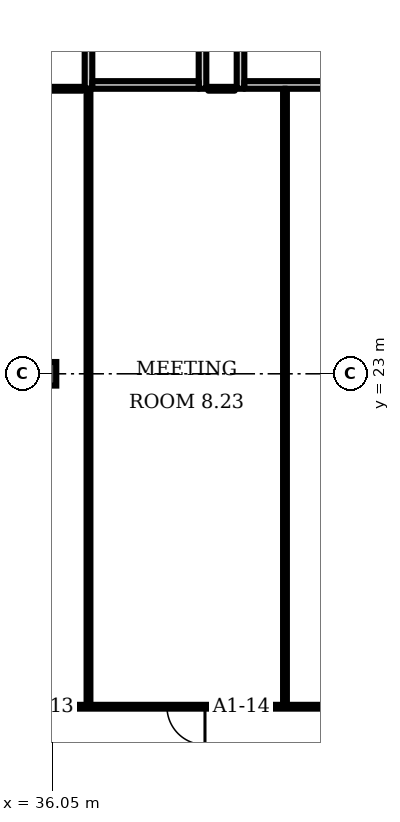
"""IFC4 building model, lengths in metres.
Left out: names, types, materials, properties, quantities, classifications, styles, units other than length and angle.
Written with IfcOpenShell. Run it as: python <this file> out.ifc"""

import sys

from ifc_helpers import new_model, si_unit, direction, frame, frame_2d, origin, origin_2d, place, context, subcontext, project, spatial, rectangle, i_section, extrude, element, fill, save


model = new_model("IFC4")
c1 = context("Model", 3, precision=1e-05, world=origin(), true_north=direction((0.0, 1.0)))
c2 = subcontext(c1, "Body", "Model", "MODEL_VIEW")
j1 = project(units=[si_unit("LENGTHUNIT", "METRE"), si_unit("PLANEANGLEUNIT", "RADIAN")], contexts=[c1])
p1 = place(None, origin())
s1 = spatial("IfcSite", under=j1, at=p1, CompositionType="ELEMENT")
p2 = place(p1, origin())
s2 = spatial("IfcBuilding", under=s1, at=p2, CompositionType="ELEMENT")
p3 = place(p2, frame((0.0, 0.0, 48.7)))
s3 = spatial("IfcBuildingStorey", under=s2, at=p3, CompositionType="ELEMENT", Elevation=48.7)
p4 = place(p3, frame((36.0, 23.0, 0.0), z_axis=(0.0, 0.0, 1.0), x_axis=(1.0, 0.0, 0.0)))
e1 = element("IfcColumn", 1, at=p4, inside=s3, PredefinedType="COLUMN", context=c2, shape_type="SweptSolid", body=[
    extrude(i_section(OverallWidth=0.305, OverallDepth=0.62, WebThickness=0.021, FlangeThickness=0.04, FilletRadius=0.027, at=origin_2d()), origin(), (0.0, 0.0, 1.0), 3.6),
])
p5 = place(p3, frame((37.0, 30.5, 0.0), z_axis=(0.0, 0.0, 1.0), x_axis=(0.0, 1.0, 0.0)))
e2 = element("IfcWall", 2, at=p5, inside=s3, PredefinedType="PARTITIONING", context=c2, shape_type="SweptSolid", body=[
    extrude(rectangle(XDim=3.5, YDim=0.2, at=frame_2d((1.75, 0.0))), origin(), (0.0, 0.0, 1.0), 3.2),
])
p6 = place(p5, frame((1.2, 0.0, 0.0)))
e3 = element("IfcOpeningElement", 3, at=p6, cuts=e2, PredefinedType="OPENING", context=c2, shape_type="SweptSolid", body=[
    extrude(rectangle(XDim=1.1, YDim=2.1, at=frame_2d((0.55, 1.05))), frame((0.0, 0.11, 0.0), z_axis=(0.0, -1.0, 0.0), x_axis=(1.0, 0.0, 0.0)), (0.0, 0.0, 1.0), 0.22),
])
p7 = place(p3, frame((40.0, 30.5, 0.0), z_axis=(0.0, 0.0, 1.0), x_axis=(0.0, 1.0, 0.0)))
e4 = element("IfcWall", 4, at=p7, inside=s3, PredefinedType="PARTITIONING", context=c2, shape_type="SweptSolid", body=[
    extrude(rectangle(XDim=3.5, YDim=0.2, at=frame_2d((1.75, 0.0))), origin(), (0.0, 0.0, 1.0), 3.2),
])
p8 = place(p3, frame((37.1, 30.6, 0.0), z_axis=(0.0, 0.0, 1.0), x_axis=(1.0, 0.0, 0.0)))
e5 = element("IfcWall", 5, at=p8, inside=s3, PredefinedType="PARTITIONING", context=c2, shape_type="SweptSolid", body=[
    extrude(rectangle(XDim=2.8, YDim=0.2, at=frame_2d((1.4, 0.0))), origin(), (0.0, 0.0, 1.0), 3.2),
])
p9 = place(p3, frame((41.0, 30.5, 0.0), z_axis=(0.0, 0.0, 1.0), x_axis=(0.0, 1.0, 0.0)))
e6 = element("IfcWall", 6, at=p9, inside=s3, PredefinedType="PARTITIONING", context=c2, shape_type="SweptSolid", body=[
    extrude(rectangle(XDim=3.5, YDim=0.2, at=frame_2d((1.75, 0.0))), origin(), (0.0, 0.0, 1.0), 3.2),
])
p10 = place(p3, frame((41.1, 30.6, 0.0), z_axis=(0.0, 0.0, 1.0), x_axis=(1.0, 0.0, 0.0)))
e7 = element("IfcWall", 7, at=p10, inside=s3, PredefinedType="PARTITIONING", context=c2, shape_type="SweptSolid", body=[
    extrude(rectangle(XDim=2.8, YDim=0.2, at=frame_2d((1.4, 0.0))), origin(), (0.0, 0.0, 1.0), 3.2),
])
p11 = place(p3, frame((10.8, 30.5, 0.0), z_axis=(0.0, 0.0, 1.0), x_axis=(1.0, 0.0, 0.0)))
e8 = element("IfcWall", 8, at=p11, inside=s3, PredefinedType="PARTITIONING", context=c2, shape_type="SweptSolid", body=[
    extrude(rectangle(XDim=26.05, YDim=0.1, at=frame_2d((13.025, 0.0))), origin(), (0.0, 0.0, 1.0), 3.2),
])
p12 = place(p11, frame((0.235, 0.0, 0.0)))
e9 = element("IfcOpeningElement", 9, at=p12, cuts=e8, PredefinedType="OPENING", context=c2, shape_type="SweptSolid", body=[
    extrude(rectangle(XDim=1.0, YDim=2.1, at=frame_2d((0.5, 1.05))), frame((0.0, 0.06, 0.0), z_axis=(0.0, -1.0, 0.0), x_axis=(1.0, 0.0, 0.0)), (0.0, 0.0, 1.0), 0.12),
])
p13 = place(p11, frame((10.955, 0.0, 0.0)))
e10 = element("IfcOpeningElement", 10, at=p13, cuts=e8, PredefinedType="OPENING", context=c2, shape_type="SweptSolid", body=[
    extrude(rectangle(XDim=1.0, YDim=2.1, at=frame_2d((0.5, 1.05))), frame((0.0, 0.06, 0.0), z_axis=(0.0, -1.0, 0.0), x_axis=(1.0, 0.0, 0.0)), (0.0, 0.0, 1.0), 0.12),
])
p14 = place(p3, frame((11.2, 14.24, 0.0), z_axis=(0.0, 0.0, 1.0), x_axis=(1.0, 0.0, 0.0)))
e11 = element("IfcWall", 11, at=p14, inside=s3, PredefinedType="PARTITIONING", context=c2, shape_type="SweptSolid", body=[
    extrude(rectangle(XDim=51.635, YDim=0.1, at=frame_2d((25.817, 0.0))), origin(), (0.0, 0.0, 1.0), 3.2),
])
p15 = place(p14, frame((0.115, 0.0, 0.0)))
e12 = element("IfcOpeningElement", 12, at=p15, cuts=e11, PredefinedType="OPENING", context=c2, shape_type="SweptSolid", body=[
    extrude(rectangle(XDim=1.0, YDim=2.1, at=frame_2d((0.5, 1.05))), frame((0.0, 0.06, 0.0), z_axis=(0.0, -1.0, 0.0), x_axis=(1.0, 0.0, 0.0)), (0.0, 0.0, 1.0), 0.12),
])
p16 = place(p14, frame((6.635, 0.0, 0.0)))
e13 = element("IfcOpeningElement", 13, at=p16, cuts=e11, PredefinedType="OPENING", context=c2, shape_type="SweptSolid", body=[
    extrude(rectangle(XDim=1.0, YDim=2.1, at=frame_2d((0.5, 1.05))), frame((0.0, 0.06, 0.0), z_axis=(0.0, -1.0, 0.0), x_axis=(1.0, 0.0, 0.0)), (0.0, 0.0, 1.0), 0.12),
])
p17 = place(p14, frame((22.7, 0.0, 0.0)))
e14 = element("IfcOpeningElement", 14, at=p17, cuts=e11, PredefinedType="OPENING", context=c2, shape_type="SweptSolid", body=[
    extrude(rectangle(XDim=1.0, YDim=2.1, at=frame_2d((0.5, 1.05))), frame((0.0, 0.06, 0.0), z_axis=(0.0, -1.0, 0.0), x_axis=(1.0, 0.0, 0.0)), (0.0, 0.0, 1.0), 0.12),
])
p18 = place(p14, frame((27.865, 0.0, 0.0)))
e15 = element("IfcOpeningElement", 15, at=p18, cuts=e11, PredefinedType="OPENING", context=c2, shape_type="SweptSolid", body=[
    extrude(rectangle(XDim=1.0, YDim=2.1, at=frame_2d((0.5, 1.05))), frame((0.0, 0.06, 0.0), z_axis=(0.0, -1.0, 0.0), x_axis=(1.0, 0.0, 0.0)), (0.0, 0.0, 1.0), 0.12),
])
p19 = place(p14, frame((34.065, 0.0, 0.0)))
e16 = element("IfcOpeningElement", 16, at=p19, cuts=e11, PredefinedType="OPENING", context=c2, shape_type="SweptSolid", body=[
    extrude(rectangle(XDim=1.8, YDim=2.1, at=frame_2d((0.9, 1.05))), frame((0.0, 0.06, 0.0), z_axis=(0.0, -1.0, 0.0), x_axis=(1.0, 0.0, 0.0)), (0.0, 0.0, 1.0), 0.12),
])
p20 = place(p14, frame((41.765, 0.0, 0.0)))
e17 = element("IfcOpeningElement", 17, at=p20, cuts=e11, PredefinedType="OPENING", context=c2, shape_type="SweptSolid", body=[
    extrude(rectangle(XDim=1.8, YDim=2.1, at=frame_2d((0.9, 1.05))), frame((0.0, 0.06, 0.0), z_axis=(0.0, -1.0, 0.0), x_axis=(1.0, 0.0, 0.0)), (0.0, 0.0, 1.0), 0.12),
])
for number, where, z_axis, x_axis in (
    (18, (37.0, 14.24, 0.0), (0.0, 0.0, 1.0), (0.0, 1.0, 0.0)),
    (19, (42.17, 14.24, 0.0), (0.0, 0.0, 1.0), (0.0, 1.0, 0.0)),
):
    element("IfcWall", number, at=place(p3, frame(where, z_axis=z_axis, x_axis=x_axis)), inside=s3, PredefinedType="PARTITIONING", context=c2, shape_type="SweptSolid", body=[
        extrude(rectangle(XDim=16.26, YDim=0.1, at=frame_2d((8.13, 0.0))), origin(), (0.0, 0.0, 1.0), 3.2),
    ])
p21 = place(p3, frame((40.15, 30.5, 0.0), z_axis=(0.0, 0.0, 1.0), x_axis=(1.0, 0.0, 0.0)))
e20 = element("IfcWall", 20, at=p21, inside=s3, PredefinedType="PARTITIONING", context=c2, shape_type="SweptSolid", body=[
    extrude(rectangle(XDim=0.7, YDim=0.1, at=frame_2d((0.35, 0.0))), origin(), (0.0, 0.0, 1.0), 3.2),
])
p22 = place(p18, origin())
e21 = element("IfcDoor", 21, at=p22, inside=s3, OperationType="SINGLE_SWING_RIGHT", PredefinedType="DOOR", context=c2, shape_type="SweptSolid", body=[
    extrude(rectangle(XDim=1.0, YDim=2.1, at=frame_2d((0.5, 1.05))), frame((0.0, 0.025, 0.0), z_axis=(0.0, -1.0, 0.0), x_axis=(1.0, 0.0, 0.0)), (0.0, 0.0, 1.0), 0.05),
])
fill(e15, e21)
save(model, sys.argv[1])
